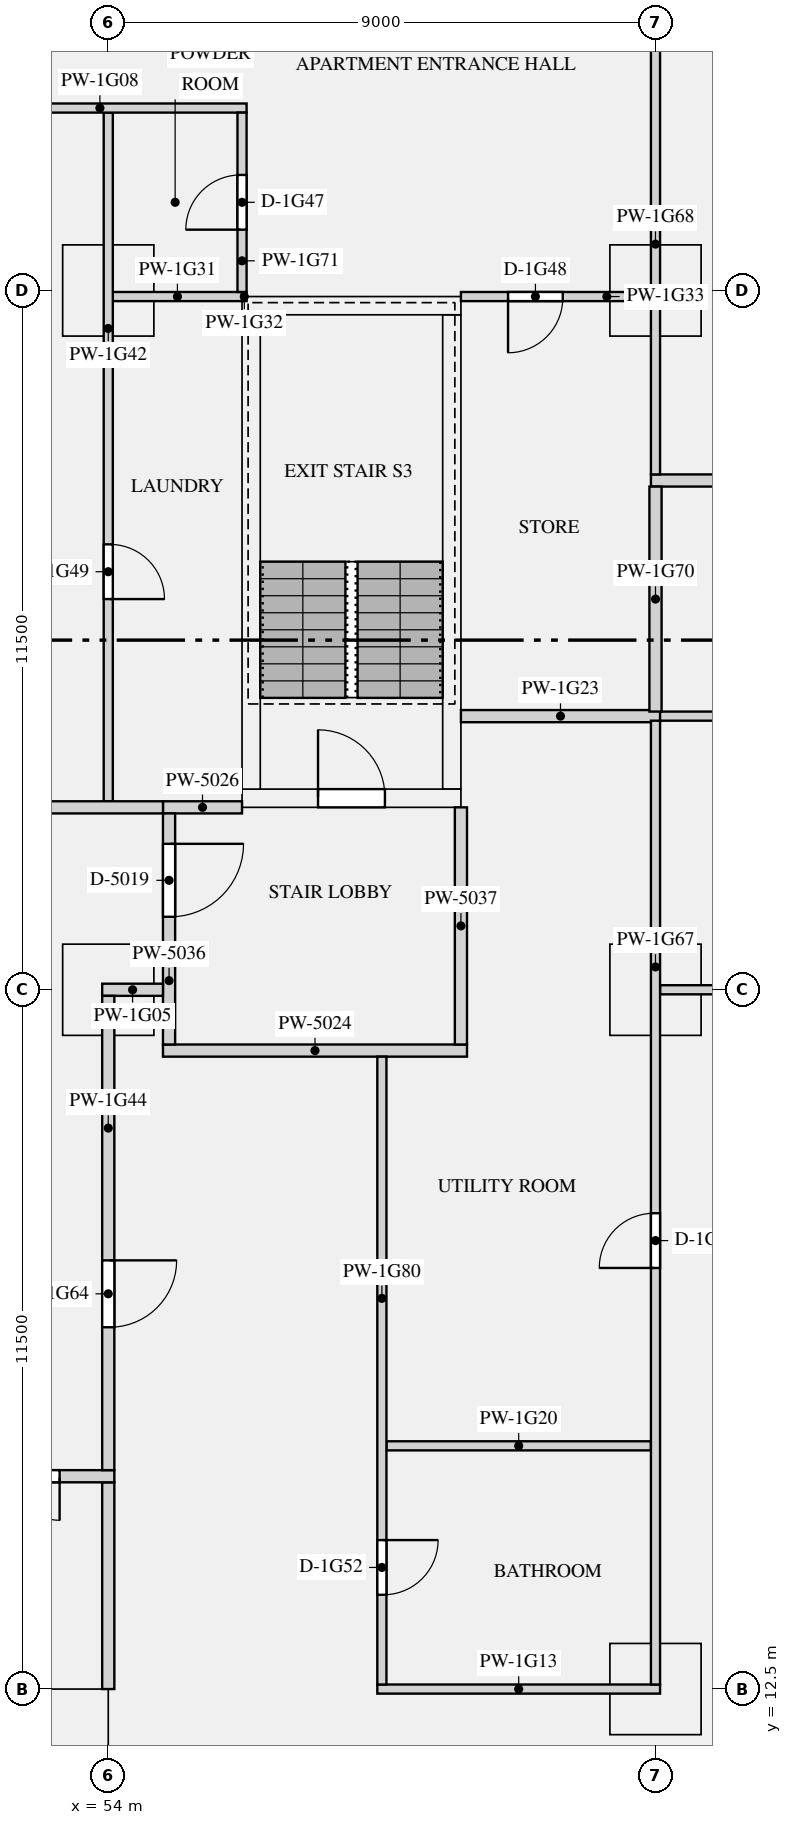
"""IFC4 building model, lengths in metres.
Left out: names, types, materials, properties, quantities, classifications, styles, units other than length and angle.
Written with IfcOpenShell. Run it as: python <this file> out.ifc"""

import sys

from ifc_helpers import new_model, si_unit, direction, frame, frame_2d, origin, origin_2d, place, context, subcontext, project, spatial, rectangle, extrude, element, fill, save


model = new_model("IFC4")
c1 = context("Model", 3, precision=1e-05, world=origin(), true_north=direction((0.0, 1.0)))
c2 = subcontext(c1, "Body", "Model", "MODEL_VIEW")
j1 = project(units=[si_unit("LENGTHUNIT", "METRE"), si_unit("PLANEANGLEUNIT", "RADIAN")], contexts=[c1])
p1 = place(None, origin())
s1 = spatial("IfcSite", under=j1, at=p1, CompositionType="ELEMENT")
p2 = place(p1, origin())
s2 = spatial("IfcBuilding", under=s1, at=p2, CompositionType="ELEMENT")
p3 = place(p2, frame((0.0, 0.0, 69.9)))
s3 = spatial("IfcBuildingStorey", under=s2, at=p3, CompositionType="ELEMENT", Elevation=69.9)
for number, where, z_axis, x_axis in (
    (1, (54.0, 24.0, 0.0), (0.0, 0.0, 1.0), (1.0, 0.0, 0.0)),
    (2, (63.0, 24.0, 0.0), (0.0, 0.0, 1.0), (1.0, 0.0, 0.0)),
    (3, (54.0, 35.5, 0.0), (0.0, 0.0, 1.0), (1.0, 0.0, 0.0)),
    (4, (63.0, 35.5, 0.0), (0.0, 0.0, 1.0), (1.0, 0.0, 0.0)),
    (5, (63.0, 12.5, 0.0), (0.0, 0.0, 1.0), (1.0, 0.0, 0.0)),
):
    element("IfcColumn", number, at=place(p3, frame(where, z_axis=z_axis, x_axis=x_axis)), inside=s3, PredefinedType="COLUMN", context=c2, shape_type="SweptSolid", body=[
        extrude(rectangle(XDim=1.5, YDim=1.5, at=origin_2d()), origin(), (0.0, 0.0, 1.0), 3.15),
    ])
p4 = place(p3, frame((53.5, 0.0, 0.0), z_axis=(0.0, 0.0, 1.0), x_axis=(0.0, 1.0, 0.0)))
e6 = element("IfcWall", 6, at=p4, inside=s3, PredefinedType="SHEAR", context=c2, shape_type="SweptSolid", body=[
    extrude(rectangle(XDim=12.5, YDim=1.0, at=frame_2d((6.25, 0.0))), origin(), (0.0, 0.0, 1.0), 3.15),
])
p5 = place(p3, frame((56.2, 27.15, 0.0), z_axis=(0.0, 0.0, 1.0), x_axis=(1.0, 0.0, 0.0)))
e7 = element("IfcWall", 7, at=p5, inside=s3, PredefinedType="SHEAR", context=c2, shape_type="SweptSolid", body=[
    extrude(rectangle(XDim=3.6, YDim=0.3, at=frame_2d((1.8, 0.0))), origin(), (0.0, 0.0, 1.0), 3.15),
])
p6 = place(p5, frame((1.25, 0.0, 0.0)))
e8 = element("IfcOpeningElement", 8, at=p6, cuts=e7, PredefinedType="OPENING", context=c2, shape_type="SweptSolid", body=[
    extrude(rectangle(XDim=1.1, YDim=2.1, at=frame_2d((0.55, 1.05))), frame((0.0, 0.16, 0.0), z_axis=(0.0, -1.0, 0.0), x_axis=(1.0, 0.0, 0.0)), (0.0, 0.0, 1.0), 0.32),
])
p7 = place(p3, frame((56.2, 35.25, 0.0), z_axis=(0.0, 0.0, 1.0), x_axis=(1.0, 0.0, 0.0)))
e9 = element("IfcWall", 9, at=p7, inside=s3, PredefinedType="SHEAR", context=c2, shape_type="SweptSolid", body=[
    extrude(rectangle(XDim=3.6, YDim=0.3, at=frame_2d((1.8, 0.0))), origin(), (0.0, 0.0, 1.0), 3.15),
])
for number, where, z_axis, x_axis in (
    (10, (56.35, 27.3, 0.0), (0.0, 0.0, 1.0), (0.0, 1.0, 0.0)),
    (11, (59.65, 27.3, 0.0), (0.0, 0.0, 1.0), (0.0, 1.0, 0.0)),
):
    element("IfcWall", number, at=place(p3, frame(where, z_axis=z_axis, x_axis=x_axis)), inside=s3, PredefinedType="SHEAR", context=c2, shape_type="SweptSolid", body=[
        extrude(rectangle(XDim=7.8, YDim=0.3, at=frame_2d((3.9, 0.0))), origin(), (0.0, 0.0, 1.0), 3.15),
    ])
p8 = place(p3, frame((54.9, 23.0, 0.0), z_axis=(0.0, 0.0, 1.0), x_axis=(1.0, 0.0, 0.0)))
e12 = element("IfcWall", 12, at=p8, inside=s3, PredefinedType="PARTITIONING", context=c2, shape_type="SweptSolid", body=[
    extrude(rectangle(XDim=5.0, YDim=0.2, at=frame_2d((2.5, 0.0))), origin(), (0.0, 0.0, 1.0), 2.65),
])
p9 = place(p3, frame((54.9, 27.0, 0.0), z_axis=(0.0, 0.0, 1.0), x_axis=(1.0, 0.0, 0.0)))
e13 = element("IfcWall", 13, at=p9, inside=s3, PredefinedType="PARTITIONING", context=c2, shape_type="SweptSolid", body=[
    extrude(rectangle(XDim=1.3, YDim=0.2, at=frame_2d((0.65, 0.0))), origin(), (0.0, 0.0, 1.0), 2.65),
])
p10 = place(p3, frame((54.0, 12.5, 0.0), z_axis=(0.0, 0.0, 1.0), x_axis=(0.0, 1.0, 0.0)))
e14 = element("IfcWall", 14, at=p10, inside=s3, PredefinedType="PARTITIONING", context=c2, shape_type="SweptSolid", body=[
    extrude(rectangle(XDim=3.4, YDim=0.2, at=frame_2d((1.7, 0.0))), origin(), (0.0, 0.0, 1.0), 2.65),
])
p11 = place(p3, frame((55.0, 23.1, 0.0), z_axis=(0.0, 0.0, 1.0), x_axis=(0.0, 1.0, 0.0)))
e15 = element("IfcWall", 15, at=p11, inside=s3, PredefinedType="PARTITIONING", context=c2, shape_type="SweptSolid", body=[
    extrude(rectangle(XDim=3.8, YDim=0.2, at=frame_2d((1.9, 0.0))), origin(), (0.0, 0.0, 1.0), 2.65),
])
p12 = place(p11, frame((2.1, 0.0, 0.0)))
e16 = element("IfcOpeningElement", 16, at=p12, cuts=e15, PredefinedType="OPENING", context=c2, shape_type="SweptSolid", body=[
    extrude(rectangle(XDim=1.2, YDim=2.1, at=frame_2d((0.6, 1.05))), frame((0.0, 0.11, 0.0), z_axis=(0.0, -1.0, 0.0), x_axis=(1.0, 0.0, 0.0)), (0.0, 0.0, 1.0), 0.22),
])
p13 = place(p3, frame((59.8, 23.1, 0.0), z_axis=(0.0, 0.0, 1.0), x_axis=(0.0, 1.0, 0.0)))
e17 = element("IfcWall", 17, at=p13, inside=s3, PredefinedType="PARTITIONING", context=c2, shape_type="SweptSolid", body=[
    extrude(rectangle(XDim=3.9, YDim=0.2, at=frame_2d((1.95, 0.0))), origin(), (0.0, 0.0, 1.0), 2.65),
])
p14 = place(p3, frame((63.075, 24.0, 0.0), z_axis=(0.0, 0.0, 1.0), x_axis=(1.0, 0.0, 0.0)))
e18 = element("IfcWall", 18, at=p14, inside=s3, PredefinedType="PARTITIONING", context=c2, shape_type="SweptSolid", body=[
    extrude(rectangle(XDim=10.125, YDim=0.15, at=frame_2d((5.062, 0.0))), origin(), (0.0, 0.0, 1.0), 2.65),
])
p15 = place(p14, frame((2.1, 0.0, 0.0)))
e19 = element("IfcOpeningElement", 19, at=p15, cuts=e18, PredefinedType="OPENING", context=c2, shape_type="SweptSolid", body=[
    extrude(rectangle(XDim=0.9, YDim=2.1, at=frame_2d((0.45, 1.05))), frame((0.0, 0.085, 0.0), z_axis=(0.0, -1.0, 0.0), x_axis=(1.0, 0.0, 0.0)), (0.0, 0.0, 1.0), 0.17),
])
p16 = place(p3, frame((53.9, 24.0, 0.0), z_axis=(0.0, 0.0, 1.0), x_axis=(1.0, 0.0, 0.0)))
e20 = element("IfcWall", 20, at=p16, inside=s3, PredefinedType="PARTITIONING", context=c2, shape_type="SweptSolid", body=[
    extrude(rectangle(XDim=1.0, YDim=0.2, at=frame_2d((0.5, 0.0))), origin(), (0.0, 0.0, 1.0), 2.65),
])
p17 = place(p3, frame((47.9, 27.0, 0.0), z_axis=(0.0, 0.0, 1.0), x_axis=(1.0, 0.0, 0.0)))
e21 = element("IfcWall", 21, at=p17, inside=s3, PredefinedType="PARTITIONING", context=c2, shape_type="SweptSolid", body=[
    extrude(rectangle(XDim=7.0, YDim=0.2, at=frame_2d((3.5, 0.0))), origin(), (0.0, 0.0, 1.0), 2.65),
])
p18 = place(p3, frame((47.9, 38.5, 0.0), z_axis=(0.0, 0.0, 1.0), x_axis=(1.0, 0.0, 0.0)))
e22 = element("IfcWall", 22, at=p18, inside=s3, PredefinedType="PARTITIONING", context=c2, shape_type="SweptSolid", body=[
    extrude(rectangle(XDim=8.375, YDim=0.15, at=frame_2d((4.188, 0.0))), origin(), (0.0, 0.0, 1.0), 2.65),
])
p19 = place(p18, frame((2.65, 0.0, 0.0)))
e23 = element("IfcOpeningElement", 23, at=p19, cuts=e22, PredefinedType="OPENING", context=c2, shape_type="SweptSolid", body=[
    extrude(rectangle(XDim=0.9, YDim=2.1, at=frame_2d((0.45, 1.05))), frame((0.0, 0.085, 0.0), z_axis=(0.0, -1.0, 0.0), x_axis=(1.0, 0.0, 0.0)), (0.0, 0.0, 1.0), 0.17),
])
p20 = place(p3, frame((58.425, 12.5, 0.0), z_axis=(0.0, 0.0, 1.0), x_axis=(1.0, 0.0, 0.0)))
e24 = element("IfcWall", 24, at=p20, inside=s3, PredefinedType="PARTITIONING", context=c2, shape_type="SweptSolid", body=[
    extrude(rectangle(XDim=4.65, YDim=0.15, at=frame_2d((2.325, 0.0))), origin(), (0.0, 0.0, 1.0), 2.65),
])
p21 = place(p3, frame((62.925, 32.375, 0.0), z_axis=(0.0, 0.0, 1.0), x_axis=(1.0, 0.0, 0.0)))
e25 = element("IfcWall", 25, at=p21, inside=s3, PredefinedType="PARTITIONING", context=c2, shape_type="SweptSolid", body=[
    extrude(rectangle(XDim=12.775, YDim=0.2, at=frame_2d((6.387, 0.0))), origin(), (0.0, 0.0, 1.0), 2.65),
])
p22 = place(p3, frame((58.575, 16.5, 0.0), z_axis=(0.0, 0.0, 1.0), x_axis=(1.0, 0.0, 0.0)))
e26 = element("IfcWall", 26, at=p22, inside=s3, PredefinedType="PARTITIONING", context=c2, shape_type="SweptSolid", body=[
    extrude(rectangle(XDim=4.35, YDim=0.15, at=frame_2d((2.175, 0.0))), origin(), (0.0, 0.0, 1.0), 2.65),
])
p23 = place(p3, frame((62.925, 28.5, 0.0), z_axis=(0.0, 0.0, 1.0), x_axis=(1.0, 0.0, 0.0)))
e27 = element("IfcWall", 27, at=p23, inside=s3, PredefinedType="PARTITIONING", context=c2, shape_type="SweptSolid", body=[
    extrude(rectangle(XDim=10.275, YDim=0.15, at=frame_2d((5.137, 0.0))), origin(), (0.0, 0.0, 1.0), 2.65),
])
p24 = place(p23, frame((4.5, 0.0, 0.0)))
e28 = element("IfcOpeningElement", 28, at=p24, cuts=e27, PredefinedType="OPENING", context=c2, shape_type="SweptSolid", body=[
    extrude(rectangle(XDim=1.5, YDim=2.1, at=frame_2d((0.75, 1.05))), frame((0.0, 0.085, 0.0), z_axis=(0.0, -1.0, 0.0), x_axis=(1.0, 0.0, 0.0)), (0.0, 0.0, 1.0), 0.17),
])
p25 = place(p3, frame((59.8, 28.5, 0.0), z_axis=(0.0, 0.0, 1.0), x_axis=(1.0, 0.0, 0.0)))
e29 = element("IfcWall", 29, at=p25, inside=s3, PredefinedType="PARTITIONING", context=c2, shape_type="SweptSolid", body=[
    extrude(rectangle(XDim=3.275, YDim=0.2, at=frame_2d((1.637, 0.0))), origin(), (0.0, 0.0, 1.0), 2.65),
])
p26 = place(p3, frame((54.075, 35.4, 0.0), z_axis=(0.0, 0.0, 1.0), x_axis=(1.0, 0.0, 0.0)))
e30 = element("IfcWall", 30, at=p26, inside=s3, PredefinedType="PARTITIONING", context=c2, shape_type="SweptSolid", body=[
    extrude(rectangle(XDim=2.125, YDim=0.15, at=frame_2d((1.062, 0.0))), origin(), (0.0, 0.0, 1.0), 2.65),
])
p27 = place(p3, frame((56.2, 35.4, 0.0), z_axis=(0.0, 0.0, 1.0), x_axis=(1.0, 0.0, 0.0)))
e31 = element("IfcWall", 31, at=p27, inside=s3, PredefinedType="PARTITIONING", context=c2, shape_type="SweptSolid", body=[
    extrude(rectangle(XDim=0.075, YDim=0.15, at=frame_2d((0.038, 0.0))), origin(), (0.0, 0.0, 1.0), 2.65),
])
p28 = place(p3, frame((59.8, 35.4, 0.0), z_axis=(0.0, 0.0, 1.0), x_axis=(1.0, 0.0, 0.0)))
e32 = element("IfcWall", 32, at=p28, inside=s3, PredefinedType="PARTITIONING", context=c2, shape_type="SweptSolid", body=[
    extrude(rectangle(XDim=3.125, YDim=0.15, at=frame_2d((1.562, 0.0))), origin(), (0.0, 0.0, 1.0), 2.65),
])
p29 = place(p28, frame((0.775, 0.0, 0.0)))
e33 = element("IfcOpeningElement", 33, at=p29, cuts=e32, PredefinedType="OPENING", context=c2, shape_type="SweptSolid", body=[
    extrude(rectangle(XDim=0.9, YDim=2.1, at=frame_2d((0.45, 1.05))), frame((0.0, 0.085, 0.0), z_axis=(0.0, -1.0, 0.0), x_axis=(1.0, 0.0, 0.0)), (0.0, 0.0, 1.0), 0.17),
])
p30 = place(p3, frame((17.9, 16.0, 0.0), z_axis=(0.0, 0.0, 1.0), x_axis=(1.0, 0.0, 0.0)))
e34 = element("IfcWall", 34, at=p30, inside=s3, PredefinedType="PARTITIONING", context=c2, shape_type="SweptSolid", body=[
    extrude(rectangle(XDim=36.2, YDim=0.2, at=frame_2d((18.1, 0.0))), origin(), (0.0, 0.0, 1.0), 2.65),
])
p31 = place(p30, frame((0.9, 0.0, 0.0)))
e35 = element("IfcOpeningElement", 35, at=p31, cuts=e34, PredefinedType="OPENING", context=c2, shape_type="SweptSolid", body=[
    extrude(rectangle(XDim=1.4, YDim=2.1, at=frame_2d((0.7, 1.05))), frame((0.0, 0.11, 0.0), z_axis=(0.0, -1.0, 0.0), x_axis=(1.0, 0.0, 0.0)), (0.0, 0.0, 1.0), 0.22),
])
p32 = place(p30, frame((33.9, 0.0, 0.0)))
e36 = element("IfcOpeningElement", 36, at=p32, cuts=e34, PredefinedType="OPENING", context=c2, shape_type="SweptSolid", body=[
    extrude(rectangle(XDim=1.4, YDim=2.1, at=frame_2d((0.7, 1.05))), frame((0.0, 0.11, 0.0), z_axis=(0.0, -1.0, 0.0), x_axis=(1.0, 0.0, 0.0)), (0.0, 0.0, 1.0), 0.22),
])
p33 = place(p3, frame((54.0, 27.1, 0.0), z_axis=(0.0, 0.0, 1.0), x_axis=(0.0, 1.0, 0.0)))
e37 = element("IfcWall", 37, at=p33, inside=s3, PredefinedType="PARTITIONING", context=c2, shape_type="SweptSolid", body=[
    extrude(rectangle(XDim=11.325, YDim=0.15, at=frame_2d((5.663, 0.0))), origin(), (0.0, 0.0, 1.0), 2.65),
])
p34 = place(p33, frame((3.325, 0.0, 0.0)))
e38 = element("IfcOpeningElement", 38, at=p34, cuts=e37, PredefinedType="OPENING", context=c2, shape_type="SweptSolid", body=[
    extrude(rectangle(XDim=0.9, YDim=2.1, at=frame_2d((0.45, 1.05))), frame((0.0, 0.085, 0.0), z_axis=(0.0, -1.0, 0.0), x_axis=(1.0, 0.0, 0.0)), (0.0, 0.0, 1.0), 0.17),
])
p35 = place(p3, frame((54.0, 16.1, 0.0), z_axis=(0.0, 0.0, 1.0), x_axis=(0.0, 1.0, 0.0)))
e39 = element("IfcWall", 39, at=p35, inside=s3, PredefinedType="PARTITIONING", context=c2, shape_type="SweptSolid", body=[
    extrude(rectangle(XDim=7.8, YDim=0.2, at=frame_2d((3.9, 0.0))), origin(), (0.0, 0.0, 1.0), 2.65),
])
p36 = place(p35, frame((2.35, 0.0, 0.0)))
e40 = element("IfcOpeningElement", 40, at=p36, cuts=e39, PredefinedType="OPENING", context=c2, shape_type="SweptSolid", body=[
    extrude(rectangle(XDim=1.1, YDim=2.1, at=frame_2d((0.55, 1.05))), frame((0.0, 0.11, 0.0), z_axis=(0.0, -1.0, 0.0), x_axis=(1.0, 0.0, 0.0)), (0.0, 0.0, 1.0), 0.22),
])
p37 = place(p3, frame((63.0, 12.575, 0.0), z_axis=(0.0, 0.0, 1.0), x_axis=(0.0, 1.0, 0.0)))
e41 = element("IfcWall", 41, at=p37, inside=s3, PredefinedType="PARTITIONING", context=c2, shape_type="SweptSolid", body=[
    extrude(rectangle(XDim=15.85, YDim=0.15, at=frame_2d((7.925, 0.0))), origin(), (0.0, 0.0, 1.0), 2.65),
])
p38 = place(p37, frame((6.85, 0.0, 0.0)))
e42 = element("IfcOpeningElement", 42, at=p38, cuts=e41, PredefinedType="OPENING", context=c2, shape_type="SweptSolid", body=[
    extrude(rectangle(XDim=0.9, YDim=2.1, at=frame_2d((0.45, 1.05))), frame((0.0, 0.085, 0.0), z_axis=(0.0, -1.0, 0.0), x_axis=(1.0, 0.0, 0.0)), (0.0, 0.0, 1.0), 0.17),
])
p39 = place(p3, frame((63.0, 32.475, 0.0), z_axis=(0.0, 0.0, 1.0), x_axis=(0.0, 1.0, 0.0)))
e43 = element("IfcWall", 43, at=p39, inside=s3, PredefinedType="PARTITIONING", context=c2, shape_type="SweptSolid", body=[
    extrude(rectangle(XDim=7.575, YDim=0.15, at=frame_2d((3.788, 0.0))), origin(), (0.0, 0.0, 1.0), 2.65),
])
p40 = place(p3, frame((63.0, 28.575, 0.0), z_axis=(0.0, 0.0, 1.0), x_axis=(0.0, 1.0, 0.0)))
e44 = element("IfcWall", 44, at=p40, inside=s3, PredefinedType="PARTITIONING", context=c2, shape_type="SweptSolid", body=[
    extrude(rectangle(XDim=3.7, YDim=0.2, at=frame_2d((1.85, 0.0))), origin(), (0.0, 0.0, 1.0), 2.65),
])
p41 = place(p3, frame((56.2, 35.475, 0.0), z_axis=(0.0, 0.0, 1.0), x_axis=(0.0, 1.0, 0.0)))
e45 = element("IfcWall", 45, at=p41, inside=s3, PredefinedType="PARTITIONING", context=c2, shape_type="SweptSolid", body=[
    extrude(rectangle(XDim=2.95, YDim=0.15, at=frame_2d((1.475, 0.0))), origin(), (0.0, 0.0, 1.0), 2.65),
])
p42 = place(p41, frame((1.025, 0.0, 0.0)))
e46 = element("IfcOpeningElement", 46, at=p42, cuts=e45, PredefinedType="OPENING", context=c2, shape_type="SweptSolid", body=[
    extrude(rectangle(XDim=0.9, YDim=2.1, at=frame_2d((0.45, 1.05))), frame((0.0, 0.085, 0.0), z_axis=(0.0, -1.0, 0.0), x_axis=(1.0, 0.0, 0.0)), (0.0, 0.0, 1.0), 0.17),
])
p43 = place(p3, frame((58.5, 12.575, 0.0), z_axis=(0.0, 0.0, 1.0), x_axis=(0.0, 1.0, 0.0)))
e47 = element("IfcWall", 47, at=p43, inside=s3, PredefinedType="PARTITIONING", context=c2, shape_type="SweptSolid", body=[
    extrude(rectangle(XDim=10.325, YDim=0.15, at=frame_2d((5.163, 0.0))), origin(), (0.0, 0.0, 1.0), 2.65),
])
p44 = place(p43, frame((1.475, 0.0, 0.0)))
e48 = element("IfcOpeningElement", 48, at=p44, cuts=e47, PredefinedType="OPENING", context=c2, shape_type="SweptSolid", body=[
    extrude(rectangle(XDim=0.9, YDim=2.1, at=frame_2d((0.45, 1.05))), frame((0.0, 0.085, 0.0), z_axis=(0.0, -1.0, 0.0), x_axis=(1.0, 0.0, 0.0)), (0.0, 0.0, 1.0), 0.17),
])
p45 = place(p6, origin())
e49 = element("IfcDoor", 49, at=p45, inside=s3, OperationType="SINGLE_SWING_LEFT", PredefinedType="DOOR", context=c2, shape_type="SweptSolid", body=[
    extrude(rectangle(XDim=1.1, YDim=2.1, at=frame_2d((0.55, 1.05))), frame((0.0, 0.025, 0.0), z_axis=(0.0, -1.0, 0.0), x_axis=(1.0, 0.0, 0.0)), (0.0, 0.0, 1.0), 0.05),
])
fill(e8, e49)
p46 = place(p12, frame((1.2, 0.0, 0.0), z_axis=(0.0, 0.0, 1.0), x_axis=(-1.0, 0.0, 0.0)))
e50 = element("IfcDoor", 50, at=p46, inside=s3, OperationType="SINGLE_SWING_LEFT", PredefinedType="DOOR", context=c2, shape_type="SweptSolid", body=[
    extrude(rectangle(XDim=1.2, YDim=2.1, at=frame_2d((0.6, 1.05))), frame((0.0, 0.025, 0.0), z_axis=(0.0, -1.0, 0.0), x_axis=(1.0, 0.0, 0.0)), (0.0, 0.0, 1.0), 0.05),
])
fill(e16, e50)
p47 = place(p32, frame((1.4, 0.0, 0.0), z_axis=(0.0, 0.0, 1.0), x_axis=(-1.0, 0.0, 0.0)))
e51 = element("IfcDoor", 51, at=p47, inside=s3, OperationType="DOUBLE_DOOR_SINGLE_SWING", PredefinedType="DOOR", context=c2, shape_type="SweptSolid", body=[
    extrude(rectangle(XDim=1.4, YDim=2.1, at=frame_2d((0.7, 1.05))), frame((0.0, 0.025, 0.0), z_axis=(0.0, -1.0, 0.0), x_axis=(1.0, 0.0, 0.0)), (0.0, 0.0, 1.0), 0.05),
])
fill(e36, e51)
p48 = place(p42, origin())
e52 = element("IfcDoor", 52, at=p48, inside=s3, OperationType="SINGLE_SWING_LEFT", PredefinedType="DOOR", context=c2, shape_type="SweptSolid", body=[
    extrude(rectangle(XDim=0.9, YDim=2.1, at=frame_2d((0.45, 1.05))), frame((0.0, 0.025, 0.0), z_axis=(0.0, -1.0, 0.0), x_axis=(1.0, 0.0, 0.0)), (0.0, 0.0, 1.0), 0.05),
])
fill(e46, e52)
p49 = place(p29, frame((0.9, 0.0, 0.0), z_axis=(0.0, 0.0, 1.0), x_axis=(-1.0, 0.0, 0.0)))
e53 = element("IfcDoor", 53, at=p49, inside=s3, OperationType="SINGLE_SWING_RIGHT", PredefinedType="DOOR", context=c2, shape_type="SweptSolid", body=[
    extrude(rectangle(XDim=0.9, YDim=2.1, at=frame_2d((0.45, 1.05))), frame((0.0, 0.025, 0.0), z_axis=(0.0, -1.0, 0.0), x_axis=(1.0, 0.0, 0.0)), (0.0, 0.0, 1.0), 0.05),
])
fill(e33, e53)
p50 = place(p34, frame((0.9, 0.0, 0.0), z_axis=(0.0, 0.0, 1.0), x_axis=(-1.0, 0.0, 0.0)))
e54 = element("IfcDoor", 54, at=p50, inside=s3, OperationType="SINGLE_SWING_RIGHT", PredefinedType="DOOR", context=c2, shape_type="SweptSolid", body=[
    extrude(rectangle(XDim=0.9, YDim=2.1, at=frame_2d((0.45, 1.05))), frame((0.0, 0.025, 0.0), z_axis=(0.0, -1.0, 0.0), x_axis=(1.0, 0.0, 0.0)), (0.0, 0.0, 1.0), 0.05),
])
fill(e38, e54)
p51 = place(p44, frame((0.9, 0.0, 0.0), z_axis=(0.0, 0.0, 1.0), x_axis=(-1.0, 0.0, 0.0)))
e55 = element("IfcDoor", 55, at=p51, inside=s3, OperationType="SINGLE_SWING_LEFT", PredefinedType="DOOR", context=c2, shape_type="SweptSolid", body=[
    extrude(rectangle(XDim=0.9, YDim=2.1, at=frame_2d((0.45, 1.05))), frame((0.0, 0.025, 0.0), z_axis=(0.0, -1.0, 0.0), x_axis=(1.0, 0.0, 0.0)), (0.0, 0.0, 1.0), 0.05),
])
fill(e48, e55)
p52 = place(p38, origin())
e56 = element("IfcDoor", 56, at=p52, inside=s3, OperationType="SINGLE_SWING_LEFT", PredefinedType="DOOR", context=c2, shape_type="SweptSolid", body=[
    extrude(rectangle(XDim=0.9, YDim=2.1, at=frame_2d((0.45, 1.05))), frame((0.0, 0.025, 0.0), z_axis=(0.0, -1.0, 0.0), x_axis=(1.0, 0.0, 0.0)), (0.0, 0.0, 1.0), 0.05),
])
fill(e42, e56)
p53 = place(p36, frame((1.1, 0.0, 0.0), z_axis=(0.0, 0.0, 1.0), x_axis=(-1.0, 0.0, 0.0)))
e57 = element("IfcDoor", 57, at=p53, inside=s3, OperationType="SINGLE_SWING_LEFT", PredefinedType="DOOR", context=c2, shape_type="SweptSolid", body=[
    extrude(rectangle(XDim=1.1, YDim=2.1, at=frame_2d((0.55, 1.05))), frame((0.0, 0.025, 0.0), z_axis=(0.0, -1.0, 0.0), x_axis=(1.0, 0.0, 0.0)), (0.0, 0.0, 1.0), 0.05),
])
fill(e40, e57)
save(model, sys.argv[1])
